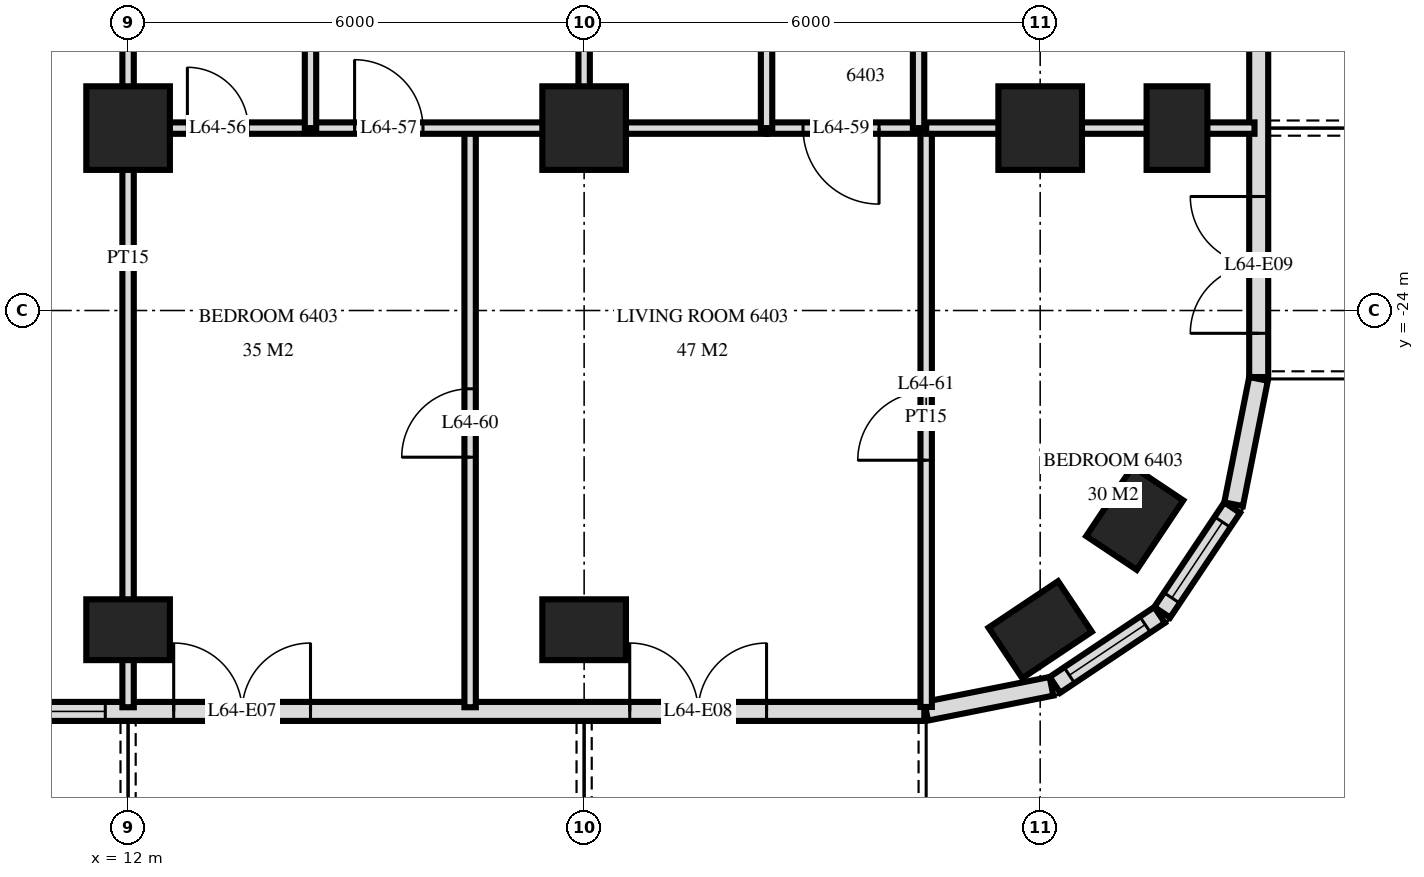
"""IFC4 building model, lengths in metres.
Left out: names, types, materials, properties, quantities, classifications, styles, units other than length and angle.
Written with IfcOpenShell. Run it as: python <this file> out.ifc"""

import sys

from ifc_helpers import new_model, si_unit, direction, frame, frame_2d, origin, origin_2d, place, context, subcontext, project, spatial, rectangle, extrude, element, fill, save


model = new_model("IFC4")
c1 = context("Model", 3, precision=1e-05, world=origin(), true_north=direction((0.0, 1.0)))
c2 = subcontext(c1, "Body", "Model", "MODEL_VIEW")
j1 = project(units=[si_unit("LENGTHUNIT", "METRE"), si_unit("PLANEANGLEUNIT", "RADIAN")], contexts=[c1])
p1 = place(None, origin())
s1 = spatial("IfcSite", under=j1, at=p1, CompositionType="ELEMENT")
p2 = place(p1, origin())
s2 = spatial("IfcBuilding", under=s1, at=p2, CompositionType="ELEMENT")
p3 = place(p2, frame((0.0, 0.0, 243.1)))
s3 = spatial("IfcBuildingStorey", under=s2, at=p3, CompositionType="ELEMENT", Elevation=243.1)
p4 = place(p3, frame((12.0, -28.2, 0.0), z_axis=(0.0, 0.0, 1.0), x_axis=(1.0, 0.0, 0.0)))
e1 = element("IfcColumn", 1, at=p4, inside=s3, PredefinedType="COLUMN", context=c2, shape_type="SweptSolid", body=[
    extrude(rectangle(XDim=1.1, YDim=0.8, at=origin_2d()), origin(), (0.0, 0.0, 1.0), 3.5),
])
p5 = place(p3, frame((12.0, -21.6, 0.0), z_axis=(0.0, 0.0, 1.0), x_axis=(1.0, 0.0, 0.0)))
e2 = element("IfcColumn", 2, at=p5, inside=s3, PredefinedType="COLUMN", context=c2, shape_type="SweptSolid", body=[
    extrude(rectangle(XDim=1.1, YDim=1.1, at=origin_2d()), origin(), (0.0, 0.0, 1.0), 3.5),
])
p6 = place(p3, frame((18.0, -28.2, 0.0), z_axis=(0.0, 0.0, 1.0), x_axis=(1.0, 0.0, 0.0)))
e3 = element("IfcColumn", 3, at=p6, inside=s3, PredefinedType="COLUMN", context=c2, shape_type="SweptSolid", body=[
    extrude(rectangle(XDim=1.1, YDim=0.8, at=origin_2d()), origin(), (0.0, 0.0, 1.0), 3.5),
])
p7 = place(p3, frame((18.0, -21.6, 0.0), z_axis=(0.0, 0.0, 1.0), x_axis=(1.0, 0.0, 0.0)))
e4 = element("IfcColumn", 4, at=p7, inside=s3, PredefinedType="COLUMN", context=c2, shape_type="SweptSolid", body=[
    extrude(rectangle(XDim=1.1, YDim=1.1, at=origin_2d()), origin(), (0.0, 0.0, 1.0), 3.5),
])
p8 = place(p3, frame((24.0, -28.2, 0.0), z_axis=(0.0, 0.0, 1.0), x_axis=(0.831459915646, 0.555584744817, 0.0)))
e5 = element("IfcColumn", 5, at=p8, inside=s3, PredefinedType="COLUMN", context=c2, shape_type="SweptSolid", body=[
    extrude(rectangle(XDim=1.1, YDim=0.8, at=origin_2d()), origin(), (0.0, 0.0, 1.0), 3.5),
])
p9 = place(p3, frame((24.0, -21.6, 0.0), z_axis=(0.0, 0.0, 1.0), x_axis=(1.0, 0.0, 0.0)))
e6 = element("IfcColumn", 6, at=p9, inside=s3, PredefinedType="COLUMN", context=c2, shape_type="SweptSolid", body=[
    extrude(rectangle(XDim=1.1, YDim=1.1, at=origin_2d()), origin(), (0.0, 0.0, 1.0), 3.5),
])
for number, where, z_axis, x_axis in (
    (7, (25.244, -26.733, 0.0), (0.0, 0.0, 1.0), (0.556, 0.831, 0.0)),
    (8, (25.8, -21.6, 0.0), (0.0, 0.0, 1.0), (0.0, 1.0, 0.0)),
):
    element("IfcColumn", number, at=place(p3, frame(where, z_axis=z_axis, x_axis=x_axis)), inside=s3, PredefinedType="COLUMN", context=c2, shape_type="SweptSolid", body=[
        extrude(rectangle(XDim=1.1, YDim=0.8, at=origin_2d()), origin(), (0.0, 0.0, 1.0), 3.5),
    ])
p10 = place(p3, frame((-22.475, -29.275, 0.0), z_axis=(0.0, 0.0, 1.0), x_axis=(1.0, 0.0, 0.0)))
e9 = element("IfcWall", 9, at=p10, inside=s3, PredefinedType="SOLIDWALL", context=c2, shape_type="SweptSolid", body=[
    extrude(rectangle(XDim=44.951, YDim=0.25, at=frame_2d((22.475, 0.0))), origin(), (0.0, 0.0, 1.0), 3.2),
])
p11 = place(p10, frame((0.575, 0.0, 0.0)))
e10 = element("IfcOpeningElement", 10, at=p11, cuts=e9, PredefinedType="OPENING", context=c2, shape_type="SweptSolid", body=[
    extrude(rectangle(XDim=1.8, YDim=2.4, at=frame_2d((0.9, 1.2))), frame((0.0, 0.135, 0.0), z_axis=(0.0, -1.0, 0.0), x_axis=(1.0, 0.0, 0.0)), (0.0, 0.0, 1.0), 0.27),
])
p12 = place(p10, frame((4.775, 0.0, 0.9)))
e11 = element("IfcOpeningElement", 11, at=p12, cuts=e9, PredefinedType="OPENING", context=c2, shape_type="SweptSolid", body=[
    extrude(rectangle(XDim=2.4, YDim=1.5, at=frame_2d((1.2, 0.75))), frame((0.0, 0.135, 0.0), z_axis=(0.0, -1.0, 0.0), x_axis=(1.0, 0.0, 0.0)), (0.0, 0.0, 1.0), 0.27),
])
p13 = place(p10, frame((8.075, 0.0, 0.0)))
e12 = element("IfcOpeningElement", 12, at=p13, cuts=e9, PredefinedType="OPENING", context=c2, shape_type="SweptSolid", body=[
    extrude(rectangle(XDim=1.8, YDim=2.4, at=frame_2d((0.9, 1.2))), frame((0.0, 0.135, 0.0), z_axis=(0.0, -1.0, 0.0), x_axis=(1.0, 0.0, 0.0)), (0.0, 0.0, 1.0), 0.27),
])
p14 = place(p10, frame((11.075, 0.0, 0.0)))
e13 = element("IfcOpeningElement", 13, at=p14, cuts=e9, PredefinedType="OPENING", context=c2, shape_type="SweptSolid", body=[
    extrude(rectangle(XDim=1.8, YDim=2.4, at=frame_2d((0.9, 1.2))), frame((0.0, 0.135, 0.0), z_axis=(0.0, -1.0, 0.0), x_axis=(1.0, 0.0, 0.0)), (0.0, 0.0, 1.0), 0.27),
])
p15 = place(p10, frame((13.775, 0.0, 0.9)))
e14 = element("IfcOpeningElement", 14, at=p15, cuts=e9, PredefinedType="OPENING", context=c2, shape_type="SweptSolid", body=[
    extrude(rectangle(XDim=2.4, YDim=1.5, at=frame_2d((1.2, 0.75))), frame((0.0, 0.135, 0.0), z_axis=(0.0, -1.0, 0.0), x_axis=(1.0, 0.0, 0.0)), (0.0, 0.0, 1.0), 0.27),
])
p16 = place(p10, frame((16.775, 0.0, 0.9)))
e15 = element("IfcOpeningElement", 15, at=p16, cuts=e9, PredefinedType="OPENING", context=c2, shape_type="SweptSolid", body=[
    extrude(rectangle(XDim=2.4, YDim=1.5, at=frame_2d((1.2, 0.75))), frame((0.0, 0.135, 0.0), z_axis=(0.0, -1.0, 0.0), x_axis=(1.0, 0.0, 0.0)), (0.0, 0.0, 1.0), 0.27),
])
p17 = place(p10, frame((20.075, 0.0, 0.0)))
e16 = element("IfcOpeningElement", 16, at=p17, cuts=e9, PredefinedType="OPENING", context=c2, shape_type="SweptSolid", body=[
    extrude(rectangle(XDim=1.8, YDim=2.4, at=frame_2d((0.9, 1.2))), frame((0.0, 0.135, 0.0), z_axis=(0.0, -1.0, 0.0), x_axis=(1.0, 0.0, 0.0)), (0.0, 0.0, 1.0), 0.27),
])
p18 = place(p10, frame((23.075, 0.0, 0.0)))
e17 = element("IfcOpeningElement", 17, at=p18, cuts=e9, PredefinedType="OPENING", context=c2, shape_type="SweptSolid", body=[
    extrude(rectangle(XDim=1.8, YDim=2.4, at=frame_2d((0.9, 1.2))), frame((0.0, 0.135, 0.0), z_axis=(0.0, -1.0, 0.0), x_axis=(1.0, 0.0, 0.0)), (0.0, 0.0, 1.0), 0.27),
])
p19 = place(p10, frame((25.775, 0.0, 0.9)))
e18 = element("IfcOpeningElement", 18, at=p19, cuts=e9, PredefinedType="OPENING", context=c2, shape_type="SweptSolid", body=[
    extrude(rectangle(XDim=2.4, YDim=1.5, at=frame_2d((1.2, 0.75))), frame((0.0, 0.135, 0.0), z_axis=(0.0, -1.0, 0.0), x_axis=(1.0, 0.0, 0.0)), (0.0, 0.0, 1.0), 0.27),
])
p20 = place(p10, frame((29.075, 0.0, 0.0)))
e19 = element("IfcOpeningElement", 19, at=p20, cuts=e9, PredefinedType="OPENING", context=c2, shape_type="SweptSolid", body=[
    extrude(rectangle(XDim=1.8, YDim=2.4, at=frame_2d((0.9, 1.2))), frame((0.0, 0.135, 0.0), z_axis=(0.0, -1.0, 0.0), x_axis=(1.0, 0.0, 0.0)), (0.0, 0.0, 1.0), 0.27),
])
p21 = place(p10, frame((31.775, 0.0, 0.9)))
e20 = element("IfcOpeningElement", 20, at=p21, cuts=e9, PredefinedType="OPENING", context=c2, shape_type="SweptSolid", body=[
    extrude(rectangle(XDim=2.4, YDim=1.5, at=frame_2d((1.2, 0.75))), frame((0.0, 0.135, 0.0), z_axis=(0.0, -1.0, 0.0), x_axis=(1.0, 0.0, 0.0)), (0.0, 0.0, 1.0), 0.27),
])
p22 = place(p10, frame((35.075, 0.0, 0.0)))
e21 = element("IfcOpeningElement", 21, at=p22, cuts=e9, PredefinedType="OPENING", context=c2, shape_type="SweptSolid", body=[
    extrude(rectangle(XDim=1.8, YDim=2.4, at=frame_2d((0.9, 1.2))), frame((0.0, 0.135, 0.0), z_axis=(0.0, -1.0, 0.0), x_axis=(1.0, 0.0, 0.0)), (0.0, 0.0, 1.0), 0.27),
])
p23 = place(p10, frame((41.075, 0.0, 0.0)))
e22 = element("IfcOpeningElement", 22, at=p23, cuts=e9, PredefinedType="OPENING", context=c2, shape_type="SweptSolid", body=[
    extrude(rectangle(XDim=1.8, YDim=2.4, at=frame_2d((0.9, 1.2))), frame((0.0, 0.135, 0.0), z_axis=(0.0, -1.0, 0.0), x_axis=(1.0, 0.0, 0.0)), (0.0, 0.0, 1.0), 0.27),
])
p24 = place(p3, frame((22.5, -29.273, 0.0), z_axis=(0.0, 0.0, 1.0), x_axis=(0.980775640221, 0.19513878023, 0.0)))
e23 = element("IfcWall", 23, at=p24, inside=s3, PredefinedType="SOLIDWALL", context=c2, shape_type="SweptSolid", body=[
    extrude(rectangle(XDim=1.681, YDim=0.25, at=frame_2d((0.841, 0.0))), origin(), (0.0, 0.0, 1.0), 3.2),
])
p25 = place(p3, frame((24.194, -28.926, 0.0), z_axis=(0.0, 0.0, 1.0), x_axis=(0.831482937015, 0.55555029066, 0.0)))
e24 = element("IfcWall", 24, at=p25, inside=s3, PredefinedType="SOLIDWALL", context=c2, shape_type="SweptSolid", body=[
    extrude(rectangle(XDim=1.656, YDim=0.25, at=frame_2d((0.828, 0.0))), origin(), (0.0, 0.0, 1.0), 3.2),
])
p26 = place(p25, frame((0.228, 0.0, 0.9)))
e25 = element("IfcOpeningElement", 25, at=p26, cuts=e24, PredefinedType="OPENING", context=c2, shape_type="SweptSolid", body=[
    extrude(rectangle(XDim=1.2, YDim=1.5, at=frame_2d((0.6, 0.75))), frame((0.0, 0.135, 0.0), z_axis=(0.0, -1.0, 0.0), x_axis=(1.0, 0.0, 0.0)), (0.0, 0.0, 1.0), 0.27),
])
p27 = place(p3, frame((25.606, -27.971, 0.0), z_axis=(0.0, 0.0, 1.0), x_axis=(0.55555029066, 0.831482937015, 0.0)))
e26 = element("IfcWall", 26, at=p27, inside=s3, PredefinedType="SOLIDWALL", context=c2, shape_type="SweptSolid", body=[
    extrude(rectangle(XDim=1.656, YDim=0.25, at=frame_2d((0.828, 0.0))), origin(), (0.0, 0.0, 1.0), 3.2),
])
p28 = place(p27, frame((0.228, 0.0, 0.9)))
e27 = element("IfcOpeningElement", 27, at=p28, cuts=e26, PredefinedType="OPENING", context=c2, shape_type="SweptSolid", body=[
    extrude(rectangle(XDim=1.2, YDim=1.5, at=frame_2d((0.6, 0.75))), frame((0.0, 0.135, 0.0), z_axis=(0.0, -1.0, 0.0), x_axis=(1.0, 0.0, 0.0)), (0.0, 0.0, 1.0), 0.27),
])
p29 = place(p3, frame((26.545, -26.549, 0.0), z_axis=(0.0, 0.0, 1.0), x_axis=(0.195026884138, 0.980797896849, 0.0)))
e28 = element("IfcWall", 28, at=p29, inside=s3, PredefinedType="SOLIDWALL", context=c2, shape_type="SweptSolid", body=[
    extrude(rectangle(XDim=1.681, YDim=0.25, at=frame_2d((0.841, 0.0))), origin(), (0.0, 0.0, 1.0), 3.2),
])
p30 = place(p3, frame((26.875, -24.875, 0.0), z_axis=(0.0, 0.0, 1.0), x_axis=(0.0, 1.0, 0.0)))
e29 = element("IfcWall", 29, at=p30, inside=s3, PredefinedType="SOLIDWALL", context=c2, shape_type="SweptSolid", body=[
    extrude(rectangle(XDim=21.551, YDim=0.25, at=frame_2d((10.775, 0.0))), origin(), (0.0, 0.0, 1.0), 3.2),
])
p31 = place(p30, frame((0.575, 0.0, 0.0)))
e30 = element("IfcOpeningElement", 30, at=p31, cuts=e29, PredefinedType="OPENING", context=c2, shape_type="SweptSolid", body=[
    extrude(rectangle(XDim=1.8, YDim=2.4, at=frame_2d((0.9, 1.2))), frame((0.0, 0.135, 0.0), z_axis=(0.0, -1.0, 0.0), x_axis=(1.0, 0.0, 0.0)), (0.0, 0.0, 1.0), 0.27),
])
p32 = place(p30, frame((4.475, 0.0, 0.0)))
e31 = element("IfcOpeningElement", 31, at=p32, cuts=e29, PredefinedType="OPENING", context=c2, shape_type="SweptSolid", body=[
    extrude(rectangle(XDim=1.8, YDim=2.4, at=frame_2d((0.9, 1.2))), frame((0.0, 0.135, 0.0), z_axis=(0.0, -1.0, 0.0), x_axis=(1.0, 0.0, 0.0)), (0.0, 0.0, 1.0), 0.27),
])
p33 = place(p30, frame((8.075, 0.0, 0.9)))
e32 = element("IfcOpeningElement", 32, at=p33, cuts=e29, PredefinedType="OPENING", context=c2, shape_type="SweptSolid", body=[
    extrude(rectangle(XDim=1.2, YDim=1.5, at=frame_2d((0.6, 0.75))), frame((0.0, 0.135, 0.0), z_axis=(0.0, -1.0, 0.0), x_axis=(1.0, 0.0, 0.0)), (0.0, 0.0, 1.0), 0.27),
])
p34 = place(p30, frame((12.225, 0.0, 0.0)))
e33 = element("IfcOpeningElement", 33, at=p34, cuts=e29, PredefinedType="OPENING", context=c2, shape_type="SweptSolid", body=[
    extrude(rectangle(XDim=1.8, YDim=2.4, at=frame_2d((0.9, 1.2))), frame((0.0, 0.135, 0.0), z_axis=(0.0, -1.0, 0.0), x_axis=(1.0, 0.0, 0.0)), (0.0, 0.0, 1.0), 0.27),
])
p35 = place(p3, frame((22.5, -29.217, 0.0), z_axis=(0.0, 0.0, 1.0), x_axis=(0.0, 1.0, 0.0)))
e34 = element("IfcWall", 34, at=p35, inside=s3, PredefinedType="PARTITIONING", context=c2, shape_type="SweptSolid", body=[
    extrude(rectangle(XDim=7.616, YDim=0.15, at=frame_2d((3.808, 0.0))), origin(), (0.0, 0.0, 1.0), 3.22),
])
p36 = place(p35, frame((3.247, 0.0, 0.0)))
e35 = element("IfcOpeningElement", 35, at=p36, cuts=e34, PredefinedType="OPENING", context=c2, shape_type="SweptSolid", body=[
    extrude(rectangle(XDim=0.9, YDim=2.1, at=frame_2d((0.45, 1.05))), frame((0.0, 0.085, 0.0), z_axis=(0.0, -1.0, 0.0), x_axis=(1.0, 0.0, 0.0)), (0.0, 0.0, 1.0), 0.17),
])
p37 = place(p3, frame((22.4, -21.6, 0.0), z_axis=(0.0, 0.0, 1.0), x_axis=(0.0, 1.0, 0.0)))
e36 = element("IfcWall", 36, at=p37, inside=s3, PredefinedType="PARTITIONING", context=c2, shape_type="SweptSolid", body=[
    extrude(rectangle(XDim=4.2, YDim=0.15, at=frame_2d((2.1, 0.0))), origin(), (0.0, 0.0, 1.0), 3.22),
])
p38 = place(p3, frame((20.4, -21.6, 0.0), z_axis=(0.0, 0.0, 1.0), x_axis=(0.0, 1.0, 0.0)))
e37 = element("IfcWall", 37, at=p38, inside=s3, PredefinedType="PARTITIONING", context=c2, shape_type="SweptSolid", body=[
    extrude(rectangle(XDim=4.2, YDim=0.15, at=frame_2d((2.1, 0.0))), origin(), (0.0, 0.0, 1.0), 3.22),
])
p39 = place(p38, frame((1.6, 0.0, 0.0)))
e38 = element("IfcOpeningElement", 38, at=p39, cuts=e37, PredefinedType="OPENING", context=c2, shape_type="SweptSolid", body=[
    extrude(rectangle(XDim=1.0, YDim=2.1, at=frame_2d((0.5, 1.05))), frame((0.0, 0.085, 0.0), z_axis=(0.0, -1.0, 0.0), x_axis=(1.0, 0.0, 0.0)), (0.0, 0.0, 1.0), 0.17),
])
p40 = place(p3, frame((18.0, -21.6, 0.0), z_axis=(0.0, 0.0, 1.0), x_axis=(0.0, 1.0, 0.0)))
e39 = element("IfcWall", 39, at=p40, inside=s3, PredefinedType="PARTITIONING", context=c2, shape_type="SweptSolid", body=[
    extrude(rectangle(XDim=4.2, YDim=0.15, at=frame_2d((2.1, 0.0))), origin(), (0.0, 0.0, 1.0), 3.22),
])
p41 = place(p3, frame((16.5, -29.22, 0.0), z_axis=(0.0, 0.0, 1.0), x_axis=(0.0, 1.0, 0.0)))
e40 = element("IfcWall", 40, at=p41, inside=s3, PredefinedType="PARTITIONING", context=c2, shape_type="SweptSolid", body=[
    extrude(rectangle(XDim=7.62, YDim=0.15, at=frame_2d((3.81, 0.0))), origin(), (0.0, 0.0, 1.0), 3.22),
])
p42 = place(p41, frame((3.29, 0.0, 0.0)))
e41 = element("IfcOpeningElement", 41, at=p42, cuts=e40, PredefinedType="OPENING", context=c2, shape_type="SweptSolid", body=[
    extrude(rectangle(XDim=0.9, YDim=2.1, at=frame_2d((0.45, 1.05))), frame((0.0, 0.085, 0.0), z_axis=(0.0, -1.0, 0.0), x_axis=(1.0, 0.0, 0.0)), (0.0, 0.0, 1.0), 0.17),
])
p43 = place(p3, frame((14.4, -21.6, 0.0), z_axis=(0.0, 0.0, 1.0), x_axis=(0.0, 1.0, 0.0)))
e42 = element("IfcWall", 42, at=p43, inside=s3, PredefinedType="PARTITIONING", context=c2, shape_type="SweptSolid", body=[
    extrude(rectangle(XDim=4.2, YDim=0.15, at=frame_2d((2.1, 0.0))), origin(), (0.0, 0.0, 1.0), 3.22),
])
p44 = place(p3, frame((12.0, -29.22, 0.0), z_axis=(0.0, 0.0, 1.0), x_axis=(0.0, 1.0, 0.0)))
e43 = element("IfcWall", 43, at=p44, inside=s3, PredefinedType="PARTITIONING", context=c2, shape_type="SweptSolid", body=[
    extrude(rectangle(XDim=11.82, YDim=0.15, at=frame_2d((5.91, 0.0))), origin(), (0.0, 0.0, 1.0), 3.22),
])
p45 = place(p3, frame((20.4, -21.6, 0.0), z_axis=(0.0, 0.0, 1.0), x_axis=(1.0, 0.0, 0.0)))
e44 = element("IfcWall", 44, at=p45, inside=s3, PredefinedType="PARTITIONING", context=c2, shape_type="SweptSolid", body=[
    extrude(rectangle(XDim=2.0, YDim=0.15, at=frame_2d((1.0, 0.0))), origin(), (0.0, 0.0, 1.0), 3.22),
])
p46 = place(p45, frame((0.48, 0.0, 0.0)))
e45 = element("IfcOpeningElement", 45, at=p46, cuts=e44, PredefinedType="OPENING", context=c2, shape_type="SweptSolid", body=[
    extrude(rectangle(XDim=1.0, YDim=2.1, at=frame_2d((0.5, 1.05))), frame((0.0, 0.085, 0.0), z_axis=(0.0, -1.0, 0.0), x_axis=(1.0, 0.0, 0.0)), (0.0, 0.0, 1.0), 0.17),
])
p47 = place(p3, frame((12.0, -21.6, 0.0), z_axis=(0.0, 0.0, 1.0), x_axis=(1.0, 0.0, 0.0)))
e46 = element("IfcWall", 46, at=p47, inside=s3, PredefinedType="PARTITIONING", context=c2, shape_type="SweptSolid", body=[
    extrude(rectangle(XDim=8.4, YDim=0.15, at=frame_2d((4.2, 0.0))), origin(), (0.0, 0.0, 1.0), 3.22),
])
p48 = place(p47, frame((0.78, 0.0, 0.0)))
e47 = element("IfcOpeningElement", 47, at=p48, cuts=e46, PredefinedType="OPENING", context=c2, shape_type="SweptSolid", body=[
    extrude(rectangle(XDim=0.8, YDim=2.1, at=frame_2d((0.4, 1.05))), frame((0.0, 0.085, 0.0), z_axis=(0.0, -1.0, 0.0), x_axis=(1.0, 0.0, 0.0)), (0.0, 0.0, 1.0), 0.17),
])
p49 = place(p47, frame((2.98, 0.0, 0.0)))
e48 = element("IfcOpeningElement", 48, at=p49, cuts=e46, PredefinedType="OPENING", context=c2, shape_type="SweptSolid", body=[
    extrude(rectangle(XDim=0.9, YDim=2.1, at=frame_2d((0.45, 1.05))), frame((0.0, 0.085, 0.0), z_axis=(0.0, -1.0, 0.0), x_axis=(1.0, 0.0, 0.0)), (0.0, 0.0, 1.0), 0.17),
])
p50 = place(p3, frame((22.5, -21.6, 0.0), z_axis=(0.0, 0.0, 1.0), x_axis=(1.0, 0.0, 0.0)))
e49 = element("IfcWall", 49, at=p50, inside=s3, PredefinedType="PARTITIONING", context=c2, shape_type="SweptSolid", body=[
    extrude(rectangle(XDim=4.32, YDim=0.15, at=frame_2d((2.16, 0.0))), origin(), (0.0, 0.0, 1.0), 3.22),
])
p51 = place(p26, origin())
e50 = element("IfcWindow", 50, at=p51, inside=s3, PartitioningType="SINGLE_PANEL", PredefinedType="WINDOW", context=c2, shape_type="SweptSolid", body=[
    extrude(rectangle(XDim=1.2, YDim=1.5, at=frame_2d((0.6, 0.75))), frame((0.0, 0.03, 0.0), z_axis=(0.0, -1.0, 0.0), x_axis=(1.0, 0.0, 0.0)), (0.0, 0.0, 1.0), 0.06),
])
fill(e25, e50)
p52 = place(p28, origin())
e51 = element("IfcWindow", 51, at=p52, inside=s3, PartitioningType="SINGLE_PANEL", PredefinedType="WINDOW", context=c2, shape_type="SweptSolid", body=[
    extrude(rectangle(XDim=1.2, YDim=1.5, at=frame_2d((0.6, 0.75))), frame((0.0, 0.03, 0.0), z_axis=(0.0, -1.0, 0.0), x_axis=(1.0, 0.0, 0.0)), (0.0, 0.0, 1.0), 0.06),
])
fill(e27, e51)
p53 = place(p21, origin())
e52 = element("IfcWindow", 52, at=p53, inside=s3, PartitioningType="SINGLE_PANEL", PredefinedType="WINDOW", context=c2, shape_type="SweptSolid", body=[
    extrude(rectangle(XDim=2.4, YDim=1.5, at=frame_2d((1.2, 0.75))), frame((0.0, 0.03, 0.0), z_axis=(0.0, -1.0, 0.0), x_axis=(1.0, 0.0, 0.0)), (0.0, 0.0, 1.0), 0.06),
])
fill(e20, e52)
p54 = place(p22, origin())
e53 = element("IfcDoor", 53, at=p54, inside=s3, OperationType="DOUBLE_DOOR_SINGLE_SWING", PredefinedType="DOOR", context=c2, shape_type="SweptSolid", body=[
    extrude(rectangle(XDim=1.8, YDim=2.4, at=frame_2d((0.9, 1.2))), frame((0.0, 0.025, 0.0), z_axis=(0.0, -1.0, 0.0), x_axis=(1.0, 0.0, 0.0)), (0.0, 0.0, 1.0), 0.05),
])
fill(e21, e53)
p55 = place(p23, origin())
e54 = element("IfcDoor", 54, at=p55, inside=s3, OperationType="DOUBLE_DOOR_SINGLE_SWING", PredefinedType="DOOR", context=c2, shape_type="SweptSolid", body=[
    extrude(rectangle(XDim=1.8, YDim=2.4, at=frame_2d((0.9, 1.2))), frame((0.0, 0.025, 0.0), z_axis=(0.0, -1.0, 0.0), x_axis=(1.0, 0.0, 0.0)), (0.0, 0.0, 1.0), 0.05),
])
fill(e22, e54)
p56 = place(p31, origin())
e55 = element("IfcDoor", 55, at=p56, inside=s3, OperationType="DOUBLE_DOOR_SINGLE_SWING", PredefinedType="DOOR", context=c2, shape_type="SweptSolid", body=[
    extrude(rectangle(XDim=1.8, YDim=2.4, at=frame_2d((0.9, 1.2))), frame((0.0, 0.025, 0.0), z_axis=(0.0, -1.0, 0.0), x_axis=(1.0, 0.0, 0.0)), (0.0, 0.0, 1.0), 0.05),
])
fill(e30, e55)
p57 = place(p48, origin())
e56 = element("IfcDoor", 56, at=p57, inside=s3, OperationType="SINGLE_SWING_RIGHT", PredefinedType="DOOR", context=c2, shape_type="SweptSolid", body=[
    extrude(rectangle(XDim=0.8, YDim=2.1, at=frame_2d((0.4, 1.05))), frame((0.0, 0.025, 0.0), z_axis=(0.0, -1.0, 0.0), x_axis=(1.0, 0.0, 0.0)), (0.0, 0.0, 1.0), 0.05),
])
fill(e47, e56)
p58 = place(p49, origin())
e57 = element("IfcDoor", 57, at=p58, inside=s3, OperationType="SINGLE_SWING_RIGHT", PredefinedType="DOOR", context=c2, shape_type="SweptSolid", body=[
    extrude(rectangle(XDim=0.9, YDim=2.1, at=frame_2d((0.45, 1.05))), frame((0.0, 0.025, 0.0), z_axis=(0.0, -1.0, 0.0), x_axis=(1.0, 0.0, 0.0)), (0.0, 0.0, 1.0), 0.05),
])
fill(e48, e57)
p59 = place(p46, frame((0.5, 0.0, 0.0), z_axis=(0.0, 0.0, 1.0), x_axis=(-1.0, 0.0, 0.0)))
e58 = element("IfcDoor", 58, at=p59, inside=s3, OperationType="SINGLE_SWING_RIGHT", PredefinedType="DOOR", context=c2, shape_type="SweptSolid", body=[
    extrude(rectangle(XDim=1.0, YDim=2.1, at=frame_2d((0.0, 1.05))), frame((0.0, -0.025, 0.0), z_axis=(0.0, 1.0, 0.0), x_axis=(-1.0, 0.0, 0.0)), (0.0, 0.0, 1.0), 0.05),
])
fill(e45, e58)
p60 = place(p42, origin())
e59 = element("IfcDoor", 59, at=p60, inside=s3, OperationType="SINGLE_SWING_RIGHT", PredefinedType="DOOR", context=c2, shape_type="SweptSolid", body=[
    extrude(rectangle(XDim=0.9, YDim=2.1, at=frame_2d((0.45, 1.05))), frame((0.0, 0.025, 0.0), z_axis=(0.0, -1.0, 0.0), x_axis=(1.0, 0.0, 0.0)), (0.0, 0.0, 1.0), 0.05),
])
fill(e41, e59)
p61 = place(p36, origin())
e60 = element("IfcDoor", 60, at=p61, inside=s3, OperationType="SINGLE_SWING_RIGHT", PredefinedType="DOOR", context=c2, shape_type="SweptSolid", body=[
    extrude(rectangle(XDim=0.9, YDim=2.1, at=frame_2d((0.45, 1.05))), frame((0.0, 0.025, 0.0), z_axis=(0.0, -1.0, 0.0), x_axis=(1.0, 0.0, 0.0)), (0.0, 0.0, 1.0), 0.05),
])
fill(e35, e60)
save(model, sys.argv[1])
